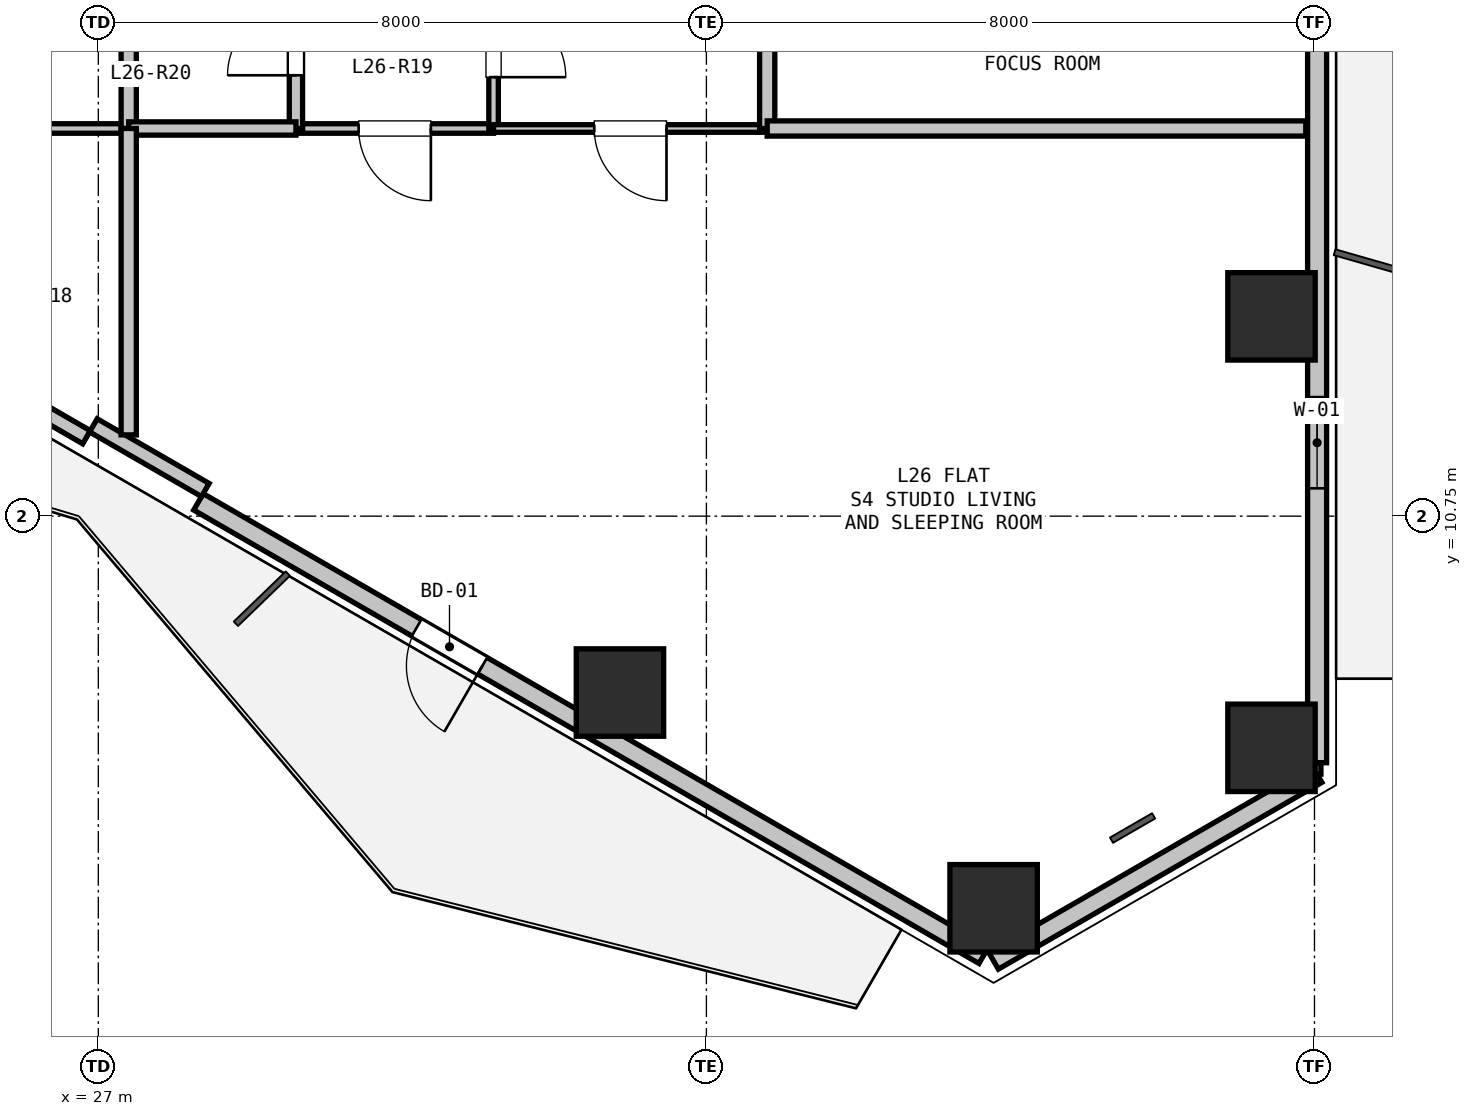
"""IFC4 building model, lengths in metres.
Left out: names, types, materials, properties, quantities, classifications, styles, units other than length and angle.
Written with IfcOpenShell. Run it as: python <this file> out.ifc"""

import sys

from ifc_helpers import new_model, si_unit, direction, frame, frame_2d, origin, origin_2d, place, context, subcontext, project, spatial, rectangle, hollow_rectangle, extrude, element, fill, save


model = new_model("IFC4")
c1 = context("Model", 3, precision=1e-05, world=origin(), true_north=direction((0.0, 1.0)))
c2 = subcontext(c1, "Body", "Model", "MODEL_VIEW")
j1 = project(units=[si_unit("LENGTHUNIT", "METRE"), si_unit("PLANEANGLEUNIT", "RADIAN")], contexts=[c1])
p1 = place(None, origin())
s1 = spatial("IfcSite", under=j1, at=p1, CompositionType="ELEMENT")
p2 = place(p1, origin())
s2 = spatial("IfcBuilding", under=s1, at=p2, CompositionType="ELEMENT")
p3 = place(p2, frame((0.0, 0.0, 96.6)))
s3 = spatial("IfcBuildingStorey", under=s2, at=p3, CompositionType="ELEMENT", Elevation=96.6)
for number, where, z_axis, x_axis in (
    (1, (42.435, 13.378, 0.0), (0.0, 0.0, 1.0), (1.0, 0.0, 0.0)),
    (2, (42.435, 7.702, 0.0), (0.0, 0.0, 1.0), (1.0, 0.0, 0.0)),
    (3, (38.779, 5.591, 0.0), (0.0, 0.0, 1.0), (1.0, 0.0, 0.0)),
    (4, (33.863, 8.429, 0.0), (0.0, 0.0, 1.0), (1.0, 0.0, 0.0)),
):
    element("IfcColumn", number, at=place(p3, frame(where, z_axis=z_axis, x_axis=x_axis)), inside=s3, PredefinedType="COLUMN", context=c2, shape_type="SweptSolid", body=[
        extrude(hollow_rectangle(XDim=1.15, YDim=1.15, WallThickness=0.032, at=origin_2d()), origin(), (0.0, 0.0, 1.0), 3.3),
    ])
p4 = place(p3, frame((43.035, 7.356, 0.0), z_axis=(0.0, 0.0, 1.0), x_axis=(-0.866011848704, -0.500023477353, 0.0)))
e5 = element("IfcWall", 5, at=p4, inside=s3, PredefinedType="SOLIDWALL", context=c2, shape_type="SweptSolid", body=[
    extrude(rectangle(XDim=4.914, YDim=0.25, at=frame_2d((2.457, 0.0))), origin(), (0.0, 0.0, 1.0), 2.67),
])
p5 = place(p3, frame((43.035, 19.435, 0.0), z_axis=(0.0, 0.0, 1.0), x_axis=(0.0, -1.0, 0.0)))
e6 = element("IfcWall", 6, at=p5, inside=s3, PredefinedType="SOLIDWALL", context=c2, shape_type="SweptSolid", body=[
    extrude(rectangle(XDim=11.93, YDim=0.25, at=frame_2d((5.965, 0.0))), origin(), (0.0, 0.0, 1.0), 2.67),
])
p6 = place(p5, frame((7.119, 0.0, 0.9)))
e7 = element("IfcOpeningElement", 7, at=p6, cuts=e6, PredefinedType="OPENING", context=c2, shape_type="SweptSolid", body=[
    extrude(rectangle(XDim=1.2, YDim=1.4, at=frame_2d((0.6, 0.7))), frame((0.0, 0.135, 0.0), z_axis=(0.0, -1.0, 0.0), x_axis=(1.0, 0.0, 0.0)), (0.0, 0.0, 1.0), 0.27),
])
p7 = place(p3, frame((38.649, 4.973, 0.0), z_axis=(0.0, 0.0, 1.0), x_axis=(-0.866023023012, 0.500004123596, 0.0)))
e8 = element("IfcWall", 8, at=p7, inside=s3, PredefinedType="SOLIDWALL", context=c2, shape_type="SweptSolid", body=[
    extrude(rectangle(XDim=11.93, YDim=0.25, at=frame_2d((5.965, 0.0))), origin(), (0.0, 0.0, 1.0), 2.67),
])
p8 = place(p7, frame((7.616, 0.0, 0.0)))
e9 = element("IfcOpeningElement", 9, at=p8, cuts=e8, PredefinedType="OPENING", context=c2, shape_type="SweptSolid", body=[
    extrude(rectangle(XDim=1.0, YDim=2.1, at=frame_2d((0.5, 1.05))), frame((0.0, 0.135, 0.0), z_axis=(0.0, -1.0, 0.0), x_axis=(1.0, 0.0, 0.0)), (0.0, 0.0, 1.0), 0.27),
])
p9 = place(p3, frame((26.845, 11.788, 0.0), z_axis=(0.0, 0.0, 1.0), x_axis=(-0.866027010039, 0.499997217876, 0.0)))
e10 = element("IfcWall", 10, at=p9, inside=s3, PredefinedType="PARAPET", context=c2, shape_type="SweptSolid", body=[
    extrude(rectangle(XDim=11.229, YDim=0.2, at=frame_2d((5.615, 0.0))), origin(), (0.0, 0.0, 1.0), 0.2),
])
p10 = place(p3, frame((28.407, 11.094, 0.0), z_axis=(0.0, 0.0, 1.0), x_axis=(-0.86605165483, 0.499954529098, 0.0)))
e11 = element("IfcWall", 11, at=p10, inside=s3, PredefinedType="PARAPET", context=c2, shape_type="SweptSolid", body=[
    extrude(rectangle(XDim=1.7, YDim=0.2, at=frame_2d((0.85, 0.0))), origin(), (0.0, 0.0, 1.0), 2.67),
])
p11 = place(p3, frame((32.2, 15.85, 0.0), z_axis=(0.0, 0.0, 1.0), x_axis=(-1.0, 0.0, 0.0)))
e12 = element("IfcWall", 12, at=p11, inside=s3, PredefinedType="PARTITIONING", context=c2, shape_type="SweptSolid", body=[
    extrude(rectangle(XDim=2.6, YDim=0.125, at=frame_2d((1.3, 0.0))), origin(), (0.0, 0.0, 1.0), 3.05),
])
p12 = place(p11, frame((0.825, 0.0, 0.0)))
e13 = element("IfcOpeningElement", 13, at=p12, cuts=e12, PredefinedType="OPENING", context=c2, shape_type="SweptSolid", body=[
    extrude(rectangle(XDim=0.95, YDim=2.1, at=frame_2d((0.475, 1.05))), frame((0.0, 0.073, 0.0), z_axis=(0.0, -1.0, 0.0), x_axis=(1.0, 0.0, 0.0)), (0.0, 0.0, 1.0), 0.145),
])
p13 = place(p3, frame((29.6, 15.85, 0.0), z_axis=(0.0, 0.0, 1.0), x_axis=(0.0, 1.0, 0.0)))
e14 = element("IfcWall", 14, at=p13, inside=s3, PredefinedType="PLUMBINGWALL", context=c2, shape_type="SweptSolid", body=[
    extrude(rectangle(XDim=2.3, YDim=0.175, at=frame_2d((1.15, 0.0))), origin(), (0.0, 0.0, 1.0), 3.05),
])
p14 = place(p13, frame((0.7, 0.0, 0.0)))
e15 = element("IfcOpeningElement", 15, at=p14, cuts=e14, PredefinedType="OPENING", context=c2, shape_type="SweptSolid", body=[
    extrude(rectangle(XDim=0.9, YDim=2.1, at=frame_2d((0.45, 1.05))), frame((0.0, 0.097, 0.0), z_axis=(0.0, -1.0, 0.0), x_axis=(1.0, 0.0, 0.0)), (0.0, 0.0, 1.0), 0.195),
])
p15 = place(p3, frame((32.2, 18.15, 0.0), z_axis=(0.0, 0.0, 1.0), x_axis=(0.0, -1.0, 0.0)))
e16 = element("IfcWall", 16, at=p15, inside=s3, PredefinedType="PARTITIONING", context=c2, shape_type="SweptSolid", body=[
    extrude(rectangle(XDim=2.3, YDim=0.125, at=frame_2d((1.15, 0.0))), origin(), (0.0, 0.0, 1.0), 3.05),
])
p16 = place(p15, frame((0.675, 0.0, 0.0)))
e17 = element("IfcOpeningElement", 17, at=p16, cuts=e16, PredefinedType="OPENING", context=c2, shape_type="SweptSolid", body=[
    extrude(rectangle(XDim=0.95, YDim=2.1, at=frame_2d((0.475, 1.05))), frame((0.0, 0.073, 0.0), z_axis=(0.0, -1.0, 0.0), x_axis=(1.0, 0.0, 0.0)), (0.0, 0.0, 1.0), 0.145),
])
p17 = place(p3, frame((27.4, 15.85, 0.0), z_axis=(0.0, 0.0, 1.0), x_axis=(-1.0, 0.0, 0.0)))
e18 = element("IfcWall", 18, at=p17, inside=s3, PredefinedType="PARTITIONING", context=c2, shape_type="SweptSolid", body=[
    extrude(rectangle(XDim=3.2, YDim=0.125, at=frame_2d((1.6, 0.0))), origin(), (0.0, 0.0, 1.0), 2.423),
])
p18 = place(p17, frame((1.125, 0.0, 0.0)))
e19 = element("IfcOpeningElement", 19, at=p18, cuts=e18, PredefinedType="OPENING", context=c2, shape_type="SweptSolid", body=[
    extrude(rectangle(XDim=0.95, YDim=2.1, at=frame_2d((0.475, 1.05))), frame((0.0, 0.073, 0.0), z_axis=(0.0, -1.0, 0.0), x_axis=(1.0, 0.0, 0.0)), (0.0, 0.0, 1.0), 0.145),
])
p19 = place(p3, frame((27.4, 18.15, 0.0), z_axis=(0.0, 0.0, 1.0), x_axis=(0.0, -1.0, 0.0)))
e20 = element("IfcWall", 20, at=p19, inside=s3, PredefinedType="PARTITIONING", context=c2, shape_type="SweptSolid", body=[
    extrude(rectangle(XDim=2.3, YDim=0.2, at=frame_2d((1.15, 0.0))), origin(), (0.0, 0.0, 1.0), 3.05),
])
p20 = place(p3, frame((29.6, 15.85, 0.0), z_axis=(0.0, 0.0, 1.0), x_axis=(-1.0, 0.0, 0.0)))
e21 = element("IfcWall", 21, at=p20, inside=s3, PredefinedType="PLUMBINGWALL", context=c2, shape_type="SweptSolid", body=[
    extrude(rectangle(XDim=2.2, YDim=0.175, at=frame_2d((1.1, 0.0))), origin(), (0.0, 0.0, 1.0), 3.05),
])
p21 = place(p3, frame((35.8, 15.85, 0.0), z_axis=(0.0, 0.0, 1.0), x_axis=(-1.0, 0.0, 0.0)))
e22 = element("IfcWall", 22, at=p21, inside=s3, PredefinedType="PARTITIONING", context=c2, shape_type="SweptSolid", body=[
    extrude(rectangle(XDim=3.6, YDim=0.1, at=frame_2d((1.8, 0.0))), origin(), (0.0, 0.0, 1.0), 3.05),
])
p22 = place(p21, frame((1.325, 0.0, 0.0)))
e23 = element("IfcOpeningElement", 23, at=p22, cuts=e22, PredefinedType="OPENING", context=c2, shape_type="SweptSolid", body=[
    extrude(rectangle(XDim=0.95, YDim=2.1, at=frame_2d((0.475, 1.05))), frame((0.0, 0.06, 0.0), z_axis=(0.0, -1.0, 0.0), x_axis=(1.0, 0.0, 0.0)), (0.0, 0.0, 1.0), 0.12),
])
p23 = place(p3, frame((35.8, 18.15, 0.0), z_axis=(0.0, 0.0, 1.0), x_axis=(0.0, -1.0, 0.0)))
e24 = element("IfcWall", 24, at=p23, inside=s3, PredefinedType="PARTITIONING", context=c2, shape_type="SweptSolid", body=[
    extrude(rectangle(XDim=2.3, YDim=0.2, at=frame_2d((1.15, 0.0))), origin(), (0.0, 0.0, 1.0), 3.05),
])
p24 = place(p3, frame((42.885, 15.85, 0.0), z_axis=(0.0, 0.0, 1.0), x_axis=(-1.0, 0.0, 0.0)))
e25 = element("IfcWall", 25, at=p24, inside=s3, PredefinedType="PARTITIONING", context=c2, shape_type="SweptSolid", body=[
    extrude(rectangle(XDim=7.085, YDim=0.2, at=frame_2d((3.543, 0.0))), origin(), (0.0, 0.0, 1.0), 2.365),
])
p25 = place(p3, frame((27.4, 15.85, 0.0), z_axis=(0.0, 0.0, 1.0), x_axis=(0.0, -1.0, 0.0)))
e26 = element("IfcWall", 26, at=p25, inside=s3, PredefinedType="PARTITIONING", context=c2, shape_type="SweptSolid", body=[
    extrude(rectangle(XDim=4.031, YDim=0.2, at=frame_2d((2.016, 0.0))), origin(), (0.0, 0.0, 1.0), 2.365),
])
p26 = place(p3, frame((43.035, 7.506, 0.0), z_axis=(0.0, 0.0, 1.0), x_axis=(0.0, -1.0, 0.0)))
e27 = element("IfcWall", 27, at=p26, inside=s3, PredefinedType="PARTITIONING", context=c2, shape_type="SweptSolid", body=[
    extrude(rectangle(XDim=0.15, YDim=0.1, at=frame_2d((0.075, 0.0))), origin(), (0.0, 0.0, 1.0), 3.05),
])
p27 = place(p6, origin())
e28 = element("IfcWindow", 28, at=p27, inside=s3, PartitioningType="SINGLE_PANEL", PredefinedType="WINDOW", context=c2, shape_type="SweptSolid", body=[
    extrude(rectangle(XDim=1.2, YDim=1.4, at=frame_2d((0.6, 0.7))), frame((0.0, 0.03, 0.0), z_axis=(0.0, -1.0, 0.0), x_axis=(1.0, 0.0, 0.0)), (0.0, 0.0, 1.0), 0.06),
])
fill(e7, e28)
p28 = place(p8, origin())
e29 = element("IfcDoor", 29, at=p28, inside=s3, OperationType="SINGLE_SWING_LEFT", PredefinedType="DOOR", context=c2, shape_type="SweptSolid", body=[
    extrude(rectangle(XDim=1.0, YDim=2.1, at=frame_2d((0.5, 1.05))), frame((0.0, 0.025, 0.0), z_axis=(0.0, -1.0, 0.0), x_axis=(1.0, 0.0, 0.0)), (0.0, 0.0, 1.0), 0.05),
])
fill(e9, e29)
p29 = place(p14, origin())
e30 = element("IfcDoor", 30, at=p29, inside=s3, OperationType="SINGLE_SWING_LEFT", PredefinedType="DOOR", context=c2, shape_type="SweptSolid", body=[
    extrude(rectangle(XDim=0.9, YDim=2.1, at=frame_2d((0.45, 1.05))), frame((0.0, 0.025, 0.0), z_axis=(0.0, -1.0, 0.0), x_axis=(1.0, 0.0, 0.0)), (0.0, 0.0, 1.0), 0.05),
])
fill(e15, e30)
p30 = place(p16, origin())
e31 = element("IfcDoor", 31, at=p30, inside=s3, OperationType="SINGLE_SWING_RIGHT", PredefinedType="DOOR", context=c2, shape_type="SweptSolid", body=[
    extrude(rectangle(XDim=0.95, YDim=2.1, at=frame_2d((0.475, 1.05))), frame((0.0, 0.025, 0.0), z_axis=(0.0, -1.0, 0.0), x_axis=(1.0, 0.0, 0.0)), (0.0, 0.0, 1.0), 0.05),
])
fill(e17, e31)
p31 = place(p12, origin())
e32 = element("IfcDoor", 32, at=p31, inside=s3, OperationType="SINGLE_SWING_LEFT", PredefinedType="DOOR", context=c2, shape_type="SweptSolid", body=[
    extrude(rectangle(XDim=0.95, YDim=2.1, at=frame_2d((0.475, 1.05))), frame((0.0, 0.025, 0.0), z_axis=(0.0, -1.0, 0.0), x_axis=(1.0, 0.0, 0.0)), (0.0, 0.0, 1.0), 0.05),
])
fill(e13, e32)
p32 = place(p22, origin())
e33 = element("IfcDoor", 33, at=p32, inside=s3, OperationType="SINGLE_SWING_LEFT", PredefinedType="DOOR", context=c2, shape_type="SweptSolid", body=[
    extrude(rectangle(XDim=0.95, YDim=2.1, at=frame_2d((0.475, 1.05))), frame((0.0, 0.025, 0.0), z_axis=(0.0, -1.0, 0.0), x_axis=(1.0, 0.0, 0.0)), (0.0, 0.0, 1.0), 0.05),
])
fill(e23, e33)
save(model, sys.argv[1])
